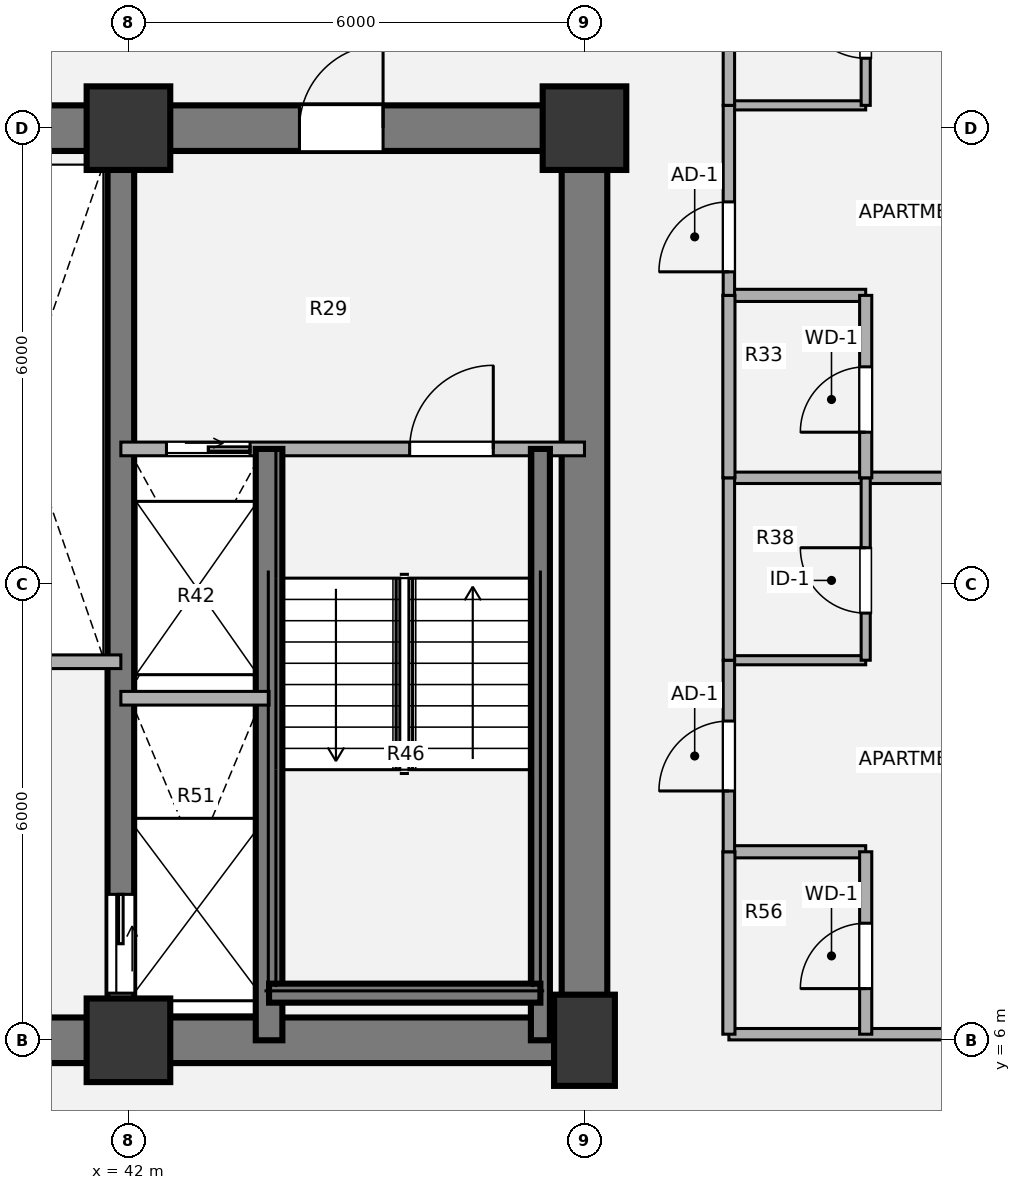
"""IFC4 building model, lengths in metres.
Left out: names, types, materials, properties, quantities, classifications, styles, units other than length and angle.
Written with IfcOpenShell. Run it as: python <this file> out.ifc"""

import sys

from ifc_helpers import new_model, si_unit, direction, frame, frame_2d, origin, origin_2d, place, context, subcontext, project, spatial, rectangle, extrude, source, transform, mapped, element, fill, save


model = new_model("IFC4")
c1 = context("Model", 3, precision=1e-05, world=origin(), true_north=direction((0.0, 1.0)))
c2 = subcontext(c1, "Body", "Model", "MODEL_VIEW")
j1 = project(units=[si_unit("LENGTHUNIT", "METRE"), si_unit("PLANEANGLEUNIT", "RADIAN")], contexts=[c1])
p1 = place(None, origin())
s1 = spatial("IfcSite", under=j1, at=p1, CompositionType="ELEMENT")
p2 = place(p1, origin())
s2 = spatial("IfcBuilding", under=s1, at=p2, CompositionType="ELEMENT")
p3 = place(p2, frame((0.0, 0.0, 30.78)))
s3 = spatial("IfcBuildingStorey", under=s2, at=p3, CompositionType="ELEMENT", Elevation=30.78)
m1 = source(origin(), c2, "Body", "SweptSolid", [
    extrude(rectangle(XDim=1.1, YDim=1.1, at=origin_2d()), origin(), (0.0, 0.0, 1.0), 3.78),
])
p4 = place(p3, frame((42.0, 6.0, 0.0), z_axis=(0.0, 0.0, 1.0), x_axis=(1.0, 0.0, 0.0)))
e1 = element("IfcColumn", 1, at=p4, inside=s3, PredefinedType="COLUMN", context=c2, shape_type="MappedRepresentation", body=[
    mapped(m1, transform((0.0, 0.0, 0.0), x_axis=(1.0, 0.0, 0.0), y_axis=(0.0, 1.0, 0.0), z_axis=(0.0, 0.0, 1.0), scale=1.0)),
])
m2 = source(origin(), c2, "Body", "SweptSolid", [
    extrude(rectangle(XDim=0.8, YDim=1.2, at=origin_2d()), origin(), (0.0, 0.0, 1.0), 3.78),
])
p5 = place(p3, frame((48.0, 6.0, 0.0), z_axis=(0.0, 0.0, 1.0), x_axis=(1.0, 0.0, 0.0)))
e2 = element("IfcColumn", 2, at=p5, inside=s3, PredefinedType="COLUMN", context=c2, shape_type="MappedRepresentation", body=[
    mapped(m2, transform((0.0, 0.0, 0.0), x_axis=(1.0, 0.0, 0.0), y_axis=(0.0, 1.0, 0.0), z_axis=(0.0, 0.0, 1.0), scale=1.0)),
])
for number, where, z_axis, x_axis in (
    (3, (42.0, 18.0, 0.0), (0.0, 0.0, 1.0), (1.0, 0.0, 0.0)),
    (4, (48.0, 18.0, 0.0), (0.0, 0.0, 1.0), (1.0, 0.0, 0.0)),
):
    element("IfcColumn", number, at=place(p3, frame(where, z_axis=z_axis, x_axis=x_axis)), inside=s3, PredefinedType="COLUMN", context=c2, shape_type="MappedRepresentation", body=[
        mapped(m1, transform((0.0, 0.0, 0.0), x_axis=(1.0, 0.0, 0.0), y_axis=(0.0, 1.0, 0.0), z_axis=(0.0, 0.0, 1.0), scale=1.0)),
    ])
p6 = place(p3, frame((48.3, 6.0, 0.0), z_axis=(0.0, 0.0, 1.0), x_axis=(-1.0, 0.0, 0.0)))
e5 = element("IfcWall", 5, at=p6, inside=s3, PredefinedType="SHEAR", context=c2, shape_type="SweptSolid", body=[
    extrude(rectangle(XDim=24.6, YDim=0.6, at=frame_2d((12.3, 0.0))), origin(), (0.0, 0.0, 1.0), 3.78),
])
p7 = place(p3, frame((48.0, 18.0, 0.0), z_axis=(0.0, 0.0, 1.0), x_axis=(0.0, -1.0, 0.0)))
e6 = element("IfcWall", 6, at=p7, inside=s3, PredefinedType="SHEAR", context=c2, shape_type="SweptSolid", body=[
    extrude(rectangle(XDim=12.0, YDim=0.6, at=frame_2d((6.0, 0.0))), origin(), (0.0, 0.0, 1.0), 3.78),
])
p8 = place(p3, frame((38.8, 18.0, 0.0), z_axis=(0.0, 0.0, 1.0), x_axis=(1.0, 0.0, 0.0)))
e7 = element("IfcWall", 7, at=p8, inside=s3, PredefinedType="SHEAR", context=c2, shape_type="SweptSolid", body=[
    extrude(rectangle(XDim=9.5, YDim=0.6, at=frame_2d((4.75, 0.0))), origin(), (0.0, 0.0, 1.0), 3.78),
])
p9 = place(p8, frame((5.45, 0.0, 0.0)))
e8 = element("IfcOpeningElement", 8, at=p9, cuts=e7, PredefinedType="OPENING", context=c2, shape_type="SweptSolid", body=[
    extrude(rectangle(XDim=1.1, YDim=2.1, at=origin_2d()), frame((0.55, 0.31, 1.05), z_axis=(0.0, -1.0, 0.0), x_axis=(1.0, 0.0, 0.0)), (0.0, 0.0, 1.0), 0.62),
])
p10 = place(p3, frame((41.9, 18.0, 0.0), z_axis=(0.0, 0.0, 1.0), x_axis=(0.0, -1.0, 0.0)))
e9 = element("IfcWall", 9, at=p10, inside=s3, PredefinedType="SHEAR", context=c2, shape_type="SweptSolid", body=[
    extrude(rectangle(XDim=12.0, YDim=0.35, at=frame_2d((6.0, 0.0))), origin(), (0.0, 0.0, 1.0), 3.78),
])
p11 = place(p10, frame((10.08, 0.0, 0.0)))
e10 = element("IfcOpeningElement", 10, at=p11, cuts=e9, PredefinedType="OPENING", context=c2, shape_type="SweptSolid", body=[
    extrude(rectangle(XDim=1.3, YDim=2.1, at=origin_2d()), frame((0.65, 0.185, 1.05), z_axis=(0.0, -1.0, 0.0), x_axis=(1.0, 0.0, 0.0)), (0.0, 0.0, 1.0), 0.37),
])
p12 = place(p3, frame((39.35, 10.98, 0.0), z_axis=(0.0, 0.0, 1.0), x_axis=(1.0, 0.0, 0.0)))
e11 = element("IfcWall", 11, at=p12, inside=s3, PredefinedType="PARTITIONING", context=c2, shape_type="SweptSolid", body=[
    extrude(rectangle(XDim=2.55, YDim=0.18, at=frame_2d((1.275, 0.0))), origin(), (0.0, 0.0, 1.0), 3.5),
])
p13 = place(p3, frame((41.9, 13.78, 0.0), z_axis=(0.0, 0.0, 1.0), x_axis=(1.0, 0.0, 0.0)))
e12 = element("IfcWall", 12, at=p13, inside=s3, PredefinedType="PARTITIONING", context=c2, shape_type="SweptSolid", body=[
    extrude(rectangle(XDim=6.1, YDim=0.18, at=frame_2d((3.05, 0.0))), origin(), (0.0, 0.0, 1.0), 3.5),
])
p14 = place(p13, frame((0.6, 0.0, 0.0)))
e13 = element("IfcOpeningElement", 13, at=p14, cuts=e12, PredefinedType="OPENING", context=c2, shape_type="SweptSolid", body=[
    extrude(rectangle(XDim=1.1, YDim=2.1, at=origin_2d()), frame((0.55, 0.1, 1.05), z_axis=(0.0, -1.0, 0.0), x_axis=(1.0, 0.0, 0.0)), (0.0, 0.0, 1.0), 0.2),
])
p15 = place(p13, frame((3.8, 0.0, 0.0)))
e14 = element("IfcOpeningElement", 14, at=p15, cuts=e12, PredefinedType="OPENING", context=c2, shape_type="SweptSolid", body=[
    extrude(rectangle(XDim=1.1, YDim=2.1, at=origin_2d()), frame((0.55, 0.1, 1.05), z_axis=(0.0, -1.0, 0.0), x_axis=(1.0, 0.0, 0.0)), (0.0, 0.0, 1.0), 0.2),
])
p16 = place(p3, frame((43.85, 6.0, 0.0), z_axis=(0.0, 0.0, 1.0), x_axis=(0.0, 1.0, 0.0)))
e15 = element("IfcWall", 15, at=p16, inside=s3, PredefinedType="SHEAR", context=c2, shape_type="SweptSolid", body=[
    extrude(rectangle(XDim=7.78, YDim=0.35, at=frame_2d((3.89, 0.0))), origin(), (0.0, 0.0, 1.0), 3.85),
])
p17 = place(p3, frame((47.42, 6.0, 0.0), z_axis=(0.0, 0.0, 1.0), x_axis=(0.0, 1.0, 0.0)))
e16 = element("IfcWall", 16, at=p17, inside=s3, PredefinedType="SHEAR", context=c2, shape_type="SweptSolid", body=[
    extrude(rectangle(XDim=7.78, YDim=0.25, at=frame_2d((3.89, 0.0))), origin(), (0.0, 0.0, 1.0), 3.85),
])
p18 = place(p3, frame((43.85, 6.62, 0.0), z_axis=(0.0, 0.0, 1.0), x_axis=(1.0, 0.0, 0.0)))
e17 = element("IfcWall", 17, at=p18, inside=s3, PredefinedType="SHEAR", context=c2, shape_type="SweptSolid", body=[
    extrude(rectangle(XDim=3.57, YDim=0.25, at=frame_2d((1.785, 0.0))), origin(), (0.0, 0.0, 1.0), 3.85),
])
p19 = place(p3, frame((41.9, 10.5, 0.0), z_axis=(0.0, 0.0, 1.0), x_axis=(1.0, 0.0, 0.0)))
e18 = element("IfcWall", 18, at=p19, inside=s3, PredefinedType="PARTITIONING", context=c2, shape_type="SweptSolid", body=[
    extrude(rectangle(XDim=1.95, YDim=0.18, at=frame_2d((0.975, 0.0))), origin(), (0.0, 0.0, 1.0), 3.5),
])
p20 = place(p3, frame((49.9, 6.08, 0.0), z_axis=(0.0, 0.0, 1.0), x_axis=(1.0, 0.0, 0.0)))
e19 = element("IfcWall", 19, at=p20, inside=s3, PredefinedType="PARTITIONING", context=c2, shape_type="SweptSolid", body=[
    extrude(rectangle(XDim=10.02, YDim=0.15, at=frame_2d((5.01, 0.0))), origin(), (0.0, 0.0, 1.0), 3.5),
])
p21 = place(p3, frame((49.9, 8.48, 0.0), z_axis=(0.0, 0.0, 1.0), x_axis=(1.0, 0.0, 0.0)))
e20 = element("IfcWall", 20, at=p21, inside=s3, PredefinedType="PLUMBINGWALL", context=c2, shape_type="SweptSolid", body=[
    extrude(rectangle(XDim=1.8, YDim=0.16, at=frame_2d((0.9, 0.0))), origin(), (0.0, 0.0, 1.0), 3.5),
])
p22 = place(p3, frame((49.9, 11.0, 0.0), z_axis=(0.0, 0.0, 1.0), x_axis=(1.0, 0.0, 0.0)))
e21 = element("IfcWall", 21, at=p22, inside=s3, PredefinedType="PARTITIONING", context=c2, shape_type="SweptSolid", body=[
    extrude(rectangle(XDim=1.8, YDim=0.12, at=frame_2d((0.9, 0.0))), origin(), (0.0, 0.0, 1.0), 3.5),
])
p23 = place(p3, frame((49.9, 13.4, 0.0), z_axis=(0.0, 0.0, 1.0), x_axis=(1.0, 0.0, 0.0)))
e22 = element("IfcWall", 22, at=p23, inside=s3, PredefinedType="PARTITIONING", context=c2, shape_type="SweptSolid", body=[
    extrude(rectangle(XDim=10.02, YDim=0.15, at=frame_2d((5.01, 0.0))), origin(), (0.0, 0.0, 1.0), 3.5),
])
p24 = place(p3, frame((49.9, 15.8, 0.0), z_axis=(0.0, 0.0, 1.0), x_axis=(1.0, 0.0, 0.0)))
e23 = element("IfcWall", 23, at=p24, inside=s3, PredefinedType="PLUMBINGWALL", context=c2, shape_type="SweptSolid", body=[
    extrude(rectangle(XDim=1.8, YDim=0.16, at=frame_2d((0.9, 0.0))), origin(), (0.0, 0.0, 1.0), 3.5),
])
p25 = place(p3, frame((49.9, 18.3, 0.0), z_axis=(0.0, 0.0, 1.0), x_axis=(1.0, 0.0, 0.0)))
e24 = element("IfcWall", 24, at=p25, inside=s3, PredefinedType="PARTITIONING", context=c2, shape_type="SweptSolid", body=[
    extrude(rectangle(XDim=1.8, YDim=0.12, at=frame_2d((0.9, 0.0))), origin(), (0.0, 0.0, 1.0), 2.715),
])
p26 = place(p3, frame((49.9, 6.08, 0.0), z_axis=(0.0, 0.0, 1.0), x_axis=(0.0, 1.0, 0.0)))
e25 = element("IfcWall", 25, at=p26, inside=s3, PredefinedType="PLUMBINGWALL", context=c2, shape_type="SweptSolid", body=[
    extrude(rectangle(XDim=2.4, YDim=0.16, at=frame_2d((1.2, 0.0))), origin(), (0.0, 0.0, 1.0), 3.5),
])
p27 = place(p3, frame((49.9, 8.48, 0.0), z_axis=(0.0, 0.0, 1.0), x_axis=(0.0, 1.0, 0.0)))
e26 = element("IfcWall", 26, at=p27, inside=s3, PredefinedType="PARTITIONING", context=c2, shape_type="SweptSolid", body=[
    extrude(rectangle(XDim=2.52, YDim=0.15, at=frame_2d((1.26, 0.0))), origin(), (0.0, 0.0, 1.0), 3.5),
])
p28 = place(p27, frame((0.8, 0.0, 0.0)))
e27 = element("IfcOpeningElement", 27, at=p28, cuts=e26, PredefinedType="OPENING", context=c2, shape_type="SweptSolid", body=[
    extrude(rectangle(XDim=0.92, YDim=2.1, at=origin_2d()), frame((0.46, 0.085, 1.05), z_axis=(0.0, -1.0, 0.0), x_axis=(1.0, 0.0, 0.0)), (0.0, 0.0, 1.0), 0.17),
])
p29 = place(p3, frame((49.9, 11.0, 0.0), z_axis=(0.0, 0.0, 1.0), x_axis=(0.0, 1.0, 0.0)))
e28 = element("IfcWall", 28, at=p29, inside=s3, PredefinedType="PARTITIONING", context=c2, shape_type="SweptSolid", body=[
    extrude(rectangle(XDim=2.4, YDim=0.15, at=frame_2d((1.2, 0.0))), origin(), (0.0, 0.0, 1.0), 3.5),
])
p30 = place(p3, frame((49.9, 13.4, 0.0), z_axis=(0.0, 0.0, 1.0), x_axis=(0.0, 1.0, 0.0)))
e29 = element("IfcWall", 29, at=p30, inside=s3, PredefinedType="PLUMBINGWALL", context=c2, shape_type="SweptSolid", body=[
    extrude(rectangle(XDim=2.4, YDim=0.16, at=frame_2d((1.2, 0.0))), origin(), (0.0, 0.0, 1.0), 3.5),
])
p31 = place(p3, frame((49.9, 15.8, 0.0), z_axis=(0.0, 0.0, 1.0), x_axis=(0.0, 1.0, 0.0)))
e30 = element("IfcWall", 30, at=p31, inside=s3, PredefinedType="PARTITIONING", context=c2, shape_type="SweptSolid", body=[
    extrude(rectangle(XDim=2.5, YDim=0.15, at=frame_2d((1.25, 0.0))), origin(), (0.0, 0.0, 1.0), 3.5),
])
p32 = place(p31, frame((0.31, 0.0, 0.0)))
e31 = element("IfcOpeningElement", 31, at=p32, cuts=e30, PredefinedType="OPENING", context=c2, shape_type="SweptSolid", body=[
    extrude(rectangle(XDim=0.92, YDim=2.1, at=origin_2d()), frame((0.46, 0.085, 1.05), z_axis=(0.0, -1.0, 0.0), x_axis=(1.0, 0.0, 0.0)), (0.0, 0.0, 1.0), 0.17),
])
p33 = place(p3, frame((49.9, 18.3, 0.0), z_axis=(0.0, 0.0, 1.0), x_axis=(0.0, 1.0, 0.0)))
e32 = element("IfcWall", 32, at=p33, inside=s3, PredefinedType="PARTITIONING", context=c2, shape_type="SweptSolid", body=[
    extrude(rectangle(XDim=2.4, YDim=0.15, at=frame_2d((1.2, 0.0))), origin(), (0.0, 0.0, 1.0), 3.5),
])
p34 = place(p3, frame((51.7, 6.08, 0.0), z_axis=(0.0, 0.0, 1.0), x_axis=(0.0, 1.0, 0.0)))
e33 = element("IfcWall", 33, at=p34, inside=s3, PredefinedType="PLUMBINGWALL", context=c2, shape_type="SweptSolid", body=[
    extrude(rectangle(XDim=2.4, YDim=0.16, at=frame_2d((1.2, 0.0))), origin(), (0.0, 0.0, 1.0), 3.5),
])
p35 = place(p34, frame((0.6, 0.0, 0.0)))
e34 = element("IfcOpeningElement", 34, at=p35, cuts=e33, PredefinedType="OPENING", context=c2, shape_type="SweptSolid", body=[
    extrude(rectangle(XDim=0.86, YDim=2.1, at=origin_2d()), frame((0.43, 0.09, 1.05), z_axis=(0.0, -1.0, 0.0), x_axis=(1.0, 0.0, 0.0)), (0.0, 0.0, 1.0), 0.18),
])
p36 = place(p3, frame((51.7, 11.0, 0.0), z_axis=(0.0, 0.0, 1.0), x_axis=(0.0, 1.0, 0.0)))
e35 = element("IfcWall", 35, at=p36, inside=s3, PredefinedType="PARTITIONING", context=c2, shape_type="SweptSolid", body=[
    extrude(rectangle(XDim=2.4, YDim=0.12, at=frame_2d((1.2, 0.0))), origin(), (0.0, 0.0, 1.0), 3.5),
])
p37 = place(p36, frame((0.62, 0.0, 0.0)))
e36 = element("IfcOpeningElement", 36, at=p37, cuts=e35, PredefinedType="OPENING", context=c2, shape_type="SweptSolid", body=[
    extrude(rectangle(XDim=0.86, YDim=2.1, at=origin_2d()), frame((0.43, 0.07, 1.05), z_axis=(0.0, -1.0, 0.0), x_axis=(1.0, 0.0, 0.0)), (0.0, 0.0, 1.0), 0.14),
])
p38 = place(p3, frame((51.7, 13.4, 0.0), z_axis=(0.0, 0.0, 1.0), x_axis=(0.0, 1.0, 0.0)))
e37 = element("IfcWall", 37, at=p38, inside=s3, PredefinedType="PLUMBINGWALL", context=c2, shape_type="SweptSolid", body=[
    extrude(rectangle(XDim=2.4, YDim=0.16, at=frame_2d((1.2, 0.0))), origin(), (0.0, 0.0, 1.0), 3.5),
])
p39 = place(p38, frame((0.6, 0.0, 0.0)))
e38 = element("IfcOpeningElement", 38, at=p39, cuts=e37, PredefinedType="OPENING", context=c2, shape_type="SweptSolid", body=[
    extrude(rectangle(XDim=0.86, YDim=2.1, at=origin_2d()), frame((0.43, 0.09, 1.05), z_axis=(0.0, -1.0, 0.0), x_axis=(1.0, 0.0, 0.0)), (0.0, 0.0, 1.0), 0.18),
])
p40 = place(p3, frame((51.7, 18.3, 0.0), z_axis=(0.0, 0.0, 1.0), x_axis=(0.0, 1.0, 0.0)))
e39 = element("IfcWall", 39, at=p40, inside=s3, PredefinedType="PARTITIONING", context=c2, shape_type="SweptSolid", body=[
    extrude(rectangle(XDim=2.4, YDim=0.12, at=frame_2d((1.2, 0.0))), origin(), (0.0, 0.0, 1.0), 3.5),
])
p41 = place(p40, frame((0.62, 0.0, 0.0)))
e40 = element("IfcOpeningElement", 40, at=p41, cuts=e39, PredefinedType="OPENING", context=c2, shape_type="SweptSolid", body=[
    extrude(rectangle(XDim=0.86, YDim=2.1, at=origin_2d()), frame((0.43, 0.07, 1.05), z_axis=(0.0, -1.0, 0.0), x_axis=(1.0, 0.0, 0.0)), (0.0, 0.0, 1.0), 0.14),
])
m3 = source(origin(), c2, "Body", "SweptSolid", [
    extrude(rectangle(XDim=1.1, YDim=2.1, at=origin_2d()), frame((0.55, 0.025, 1.05), z_axis=(0.0, -1.0, 0.0), x_axis=(1.0, 0.0, 0.0)), (0.0, 0.0, 1.0), 0.05),
])
p42 = place(p14, origin())
e41 = element("IfcDoor", 41, at=p42, inside=s3, OperationType="SLIDING_TO_RIGHT", PredefinedType="DOOR", context=c2, shape_type="MappedRepresentation", body=[
    mapped(m3, transform((0.0, 0.0, 0.0), x_axis=(1.0, 0.0, 0.0), y_axis=(0.0, 1.0, 0.0), z_axis=(0.0, 0.0, 1.0), scale=1.0)),
])
fill(e13, e41)
m4 = source(origin(), c2, "Body", "SweptSolid", [
    extrude(rectangle(XDim=1.1, YDim=2.1, at=origin_2d()), frame((0.55, 0.025, 1.05), z_axis=(0.0, -1.0, 0.0), x_axis=(1.0, 0.0, 0.0)), (0.0, 0.0, 1.0), 0.05),
])
p43 = place(p15, origin())
e42 = element("IfcDoor", 42, at=p43, inside=s3, OperationType="SINGLE_SWING_RIGHT", PredefinedType="DOOR", context=c2, shape_type="MappedRepresentation", body=[
    mapped(m4, transform((0.0, 0.0, 0.0), x_axis=(1.0, 0.0, 0.0), y_axis=(0.0, 1.0, 0.0), z_axis=(0.0, 0.0, 1.0), scale=1.0)),
])
fill(e14, e42)
m5 = source(origin(), c2, "Body", "SweptSolid", [
    extrude(rectangle(XDim=1.3, YDim=2.1, at=origin_2d()), frame((0.65, 0.025, 1.05), z_axis=(0.0, -1.0, 0.0), x_axis=(1.0, 0.0, 0.0)), (0.0, 0.0, 1.0), 0.05),
])
p44 = place(p11, origin())
e43 = element("IfcDoor", 43, at=p44, inside=s3, OperationType="SLIDING_TO_LEFT", PredefinedType="DOOR", context=c2, shape_type="MappedRepresentation", body=[
    mapped(m5, transform((0.0, 0.0, 0.0), x_axis=(1.0, 0.0, 0.0), y_axis=(0.0, 1.0, 0.0), z_axis=(0.0, 0.0, 1.0), scale=1.0)),
])
fill(e10, e43)
m6 = source(origin(), c2, "Body", "SweptSolid", [
    extrude(rectangle(XDim=1.1, YDim=2.1, at=origin_2d()), frame((0.55, 0.025, 1.05), z_axis=(0.0, -1.0, 0.0), x_axis=(1.0, 0.0, 0.0)), (0.0, 0.0, 1.0), 0.05),
])
p45 = place(p9, origin())
e44 = element("IfcDoor", 44, at=p45, inside=s3, OperationType="SINGLE_SWING_RIGHT", PredefinedType="DOOR", context=c2, shape_type="MappedRepresentation", body=[
    mapped(m6, transform((0.0, 0.0, 0.0), x_axis=(1.0, 0.0, 0.0), y_axis=(0.0, 1.0, 0.0), z_axis=(0.0, 0.0, 1.0), scale=1.0)),
])
fill(e8, e44)
m7 = source(origin(), c2, "Body", "SweptSolid", [
    extrude(rectangle(XDim=0.92, YDim=2.1, at=origin_2d()), frame((0.46, 0.025, 1.05), z_axis=(0.0, -1.0, 0.0), x_axis=(1.0, 0.0, 0.0)), (0.0, 0.0, 1.0), 0.05),
])
p46 = place(p28, origin())
e45 = element("IfcDoor", 45, at=p46, inside=s3, OperationType="SINGLE_SWING_LEFT", PredefinedType="DOOR", context=c2, shape_type="MappedRepresentation", body=[
    mapped(m7, transform((0.0, 0.0, 0.0), x_axis=(1.0, 0.0, 0.0), y_axis=(0.0, 1.0, 0.0), z_axis=(0.0, 0.0, 1.0), scale=1.0)),
])
fill(e27, e45)
p47 = place(p32, origin())
e46 = element("IfcDoor", 46, at=p47, inside=s3, OperationType="SINGLE_SWING_LEFT", PredefinedType="DOOR", context=c2, shape_type="MappedRepresentation", body=[
    mapped(m7, transform((0.0, 0.0, 0.0), x_axis=(1.0, 0.0, 0.0), y_axis=(0.0, 1.0, 0.0), z_axis=(0.0, 0.0, 1.0), scale=1.0)),
])
fill(e31, e46)
m8 = source(origin(), c2, "Body", "SweptSolid", [
    extrude(rectangle(XDim=0.86, YDim=2.1, at=origin_2d()), frame((0.43, 0.025, 1.05), z_axis=(0.0, -1.0, 0.0), x_axis=(1.0, 0.0, 0.0)), (0.0, 0.0, 1.0), 0.05),
])
p48 = place(p35, origin())
e47 = element("IfcDoor", 47, at=p48, inside=s3, OperationType="SINGLE_SWING_LEFT", PredefinedType="DOOR", context=c2, shape_type="MappedRepresentation", body=[
    mapped(m8, transform((0.0, 0.0, 0.0), x_axis=(1.0, 0.0, 0.0), y_axis=(0.0, 1.0, 0.0), z_axis=(0.0, 0.0, 1.0), scale=1.0)),
])
fill(e34, e47)
m9 = source(origin(), c2, "Body", "SweptSolid", [
    extrude(rectangle(XDim=0.86, YDim=2.1, at=origin_2d()), frame((0.43, 0.025, 1.05), z_axis=(0.0, -1.0, 0.0), x_axis=(1.0, 0.0, 0.0)), (0.0, 0.0, 1.0), 0.05),
])
p49 = place(p37, origin())
e48 = element("IfcDoor", 48, at=p49, inside=s3, OperationType="SINGLE_SWING_RIGHT", PredefinedType="DOOR", context=c2, shape_type="MappedRepresentation", body=[
    mapped(m9, transform((0.0, 0.0, 0.0), x_axis=(1.0, 0.0, 0.0), y_axis=(0.0, 1.0, 0.0), z_axis=(0.0, 0.0, 1.0), scale=1.0)),
])
fill(e36, e48)
p50 = place(p39, origin())
e49 = element("IfcDoor", 49, at=p50, inside=s3, OperationType="SINGLE_SWING_LEFT", PredefinedType="DOOR", context=c2, shape_type="MappedRepresentation", body=[
    mapped(m8, transform((0.0, 0.0, 0.0), x_axis=(1.0, 0.0, 0.0), y_axis=(0.0, 1.0, 0.0), z_axis=(0.0, 0.0, 1.0), scale=1.0)),
])
fill(e38, e49)
p51 = place(p41, origin())
e50 = element("IfcDoor", 50, at=p51, inside=s3, OperationType="SINGLE_SWING_RIGHT", PredefinedType="DOOR", context=c2, shape_type="MappedRepresentation", body=[
    mapped(m9, transform((0.0, 0.0, 0.0), x_axis=(1.0, 0.0, 0.0), y_axis=(0.0, 1.0, 0.0), z_axis=(0.0, 0.0, 1.0), scale=1.0)),
])
fill(e40, e50)
save(model, sys.argv[1])
